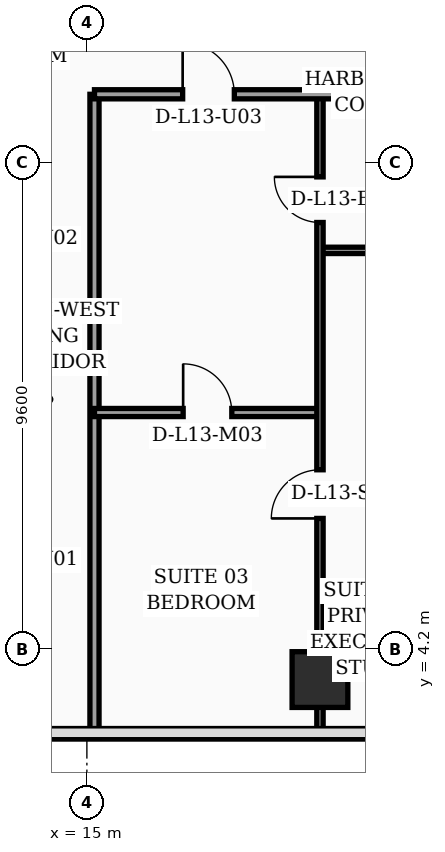
"""IFC4 building model, lengths in metres.
Left out: names, types, materials, properties, quantities, classifications, styles, units other than length and angle.
Written with IfcOpenShell. Run it as: python <this file> out.ifc"""

import sys

from ifc_helpers import new_model, si_unit, direction, frame, frame_2d, origin, origin_2d, place, context, subcontext, project, spatial, rectangle, hollow_rectangle, extrude, element, fill, save


model = new_model("IFC4")
c1 = context("Model", 3, precision=1e-05, world=origin(), true_north=direction((0.0, 1.0)))
c2 = subcontext(c1, "Body", "Model", "MODEL_VIEW")
j1 = project(units=[si_unit("LENGTHUNIT", "METRE"), si_unit("PLANEANGLEUNIT", "RADIAN")], contexts=[c1])
p1 = place(None, origin())
s1 = spatial("IfcSite", under=j1, at=p1, CompositionType="ELEMENT")
p2 = place(p1, origin())
s2 = spatial("IfcBuilding", under=s1, at=p2, CompositionType="ELEMENT")
p3 = place(p2, frame((0.0, 0.0, 58.4)))
s3 = spatial("IfcBuildingStorey", under=s2, at=p3, CompositionType="ELEMENT", Elevation=58.4)
p4 = place(p3, frame((19.6, 3.6, 0.0), z_axis=(0.0, 0.0, 1.0), x_axis=(1.0, 0.0, 0.0)))
e1 = element("IfcColumn", 1, at=p4, inside=s3, PredefinedType="COLUMN", context=c2, shape_type="SweptSolid", body=[
    extrude(hollow_rectangle(XDim=1.1, YDim=1.1, WallThickness=0.045, at=origin_2d()), origin(), (0.0, 0.0, 1.0), 3.56),
])
p5 = place(p3, frame((15.15, 2.44, 0.0), z_axis=(0.0, 0.0, 1.0), x_axis=(0.0, 1.0, 0.0)))
e2 = element("IfcWall", 2, at=p5, inside=s3, PredefinedType="PARTITIONING", context=c2, shape_type="SweptSolid", body=[
    extrude(rectangle(XDim=12.71, YDim=0.18, at=frame_2d((6.355, 0.0))), origin(), (0.0, 0.0, 1.0), 3.04),
])
p6 = place(p3, frame((19.6, 12.07, 0.0), z_axis=(0.0, 0.0, 1.0), x_axis=(1.0, 0.0, 0.0)))
e3 = element("IfcWall", 3, at=p6, inside=s3, PredefinedType="PARTITIONING", context=c2, shape_type="SweptSolid", body=[
    extrude(rectangle(XDim=2.0, YDim=0.125, at=frame_2d((1.0, 0.0))), origin(), (0.0, 0.0, 1.0), 3.56),
])
p7 = place(p3, frame((15.15, 8.87, 0.0), z_axis=(0.0, 0.0, 1.0), x_axis=(1.0, 0.0, 0.0)))
e4 = element("IfcWall", 4, at=p7, inside=s3, PredefinedType="PARTITIONING", context=c2, shape_type="SweptSolid", body=[
    extrude(rectangle(XDim=4.45, YDim=0.16, at=frame_2d((2.225, 0.0))), origin(), (0.0, 0.0, 1.0), 3.56),
])
p8 = place(p7, frame((1.75, 0.0, 0.0)))
e5 = element("IfcOpeningElement", 5, at=p8, cuts=e4, PredefinedType="OPENING", context=c2, shape_type="SweptSolid", body=[
    extrude(rectangle(XDim=0.96, YDim=2.2, at=frame_2d((0.48, 1.1))), frame((0.0, 0.09, 0.0), z_axis=(0.0, -1.0, 0.0), x_axis=(1.0, 0.0, 0.0)), (0.0, 0.0, 1.0), 0.18),
])
p9 = place(p3, frame((19.6, 2.44, 0.0), z_axis=(0.0, 0.0, 1.0), x_axis=(0.0, 1.0, 0.0)))
e6 = element("IfcWall", 6, at=p9, inside=s3, PredefinedType="PARTITIONING", context=c2, shape_type="SweptSolid", body=[
    extrude(rectangle(XDim=12.71, YDim=0.125, at=frame_2d((6.355, 0.0))), origin(), (0.0, 0.0, 1.0), 2.34),
])
p10 = place(p9, frame((4.34, 0.0, 0.0)))
e7 = element("IfcOpeningElement", 7, at=p10, cuts=e6, PredefinedType="OPENING", context=c2, shape_type="SweptSolid", body=[
    extrude(rectangle(XDim=0.96, YDim=2.2, at=frame_2d((0.48, 1.1))), frame((0.0, 0.073, 0.0), z_axis=(0.0, -1.0, 0.0), x_axis=(1.0, 0.0, 0.0)), (0.0, 0.0, 1.0), 0.145),
])
p11 = place(p9, frame((10.18, 0.0, 0.0)))
e8 = element("IfcOpeningElement", 8, at=p11, cuts=e6, PredefinedType="OPENING", context=c2, shape_type="SweptSolid", body=[
    extrude(rectangle(XDim=0.9, YDim=2.15, at=frame_2d((0.45, 1.075))), frame((0.0, 0.073, 0.0), z_axis=(0.0, -1.0, 0.0), x_axis=(1.0, 0.0, 0.0)), (0.0, 0.0, 1.0), 0.145),
])
p12 = place(p3, frame((15.15, 15.15, 0.0), z_axis=(0.0, 0.0, 1.0), x_axis=(1.0, 0.0, 0.0)))
e9 = element("IfcWall", 9, at=p12, inside=s3, PredefinedType="PARTITIONING", context=c2, shape_type="SweptSolid", body=[
    extrude(rectangle(XDim=6.45, YDim=0.18, at=frame_2d((3.225, 0.0))), origin(), (0.0, 0.0, 1.0), 2.34),
])
p13 = place(p12, frame((1.74, 0.0, 0.0)))
e10 = element("IfcOpeningElement", 10, at=p13, cuts=e9, PredefinedType="OPENING", context=c2, shape_type="SweptSolid", body=[
    extrude(rectangle(XDim=1.02, YDim=2.2, at=frame_2d((0.51, 1.1))), frame((0.0, 0.1, 0.0), z_axis=(0.0, -1.0, 0.0), x_axis=(1.0, 0.0, 0.0)), (0.0, 0.0, 1.0), 0.2),
])
p14 = place(p8, origin())
e11 = element("IfcDoor", 11, at=p14, inside=s3, OperationType="SINGLE_SWING_LEFT", PredefinedType="DOOR", context=c2, shape_type="SweptSolid", body=[
    extrude(rectangle(XDim=0.96, YDim=2.2, at=frame_2d((0.48, 1.1))), frame((0.0, 0.025, 0.0), z_axis=(0.0, -1.0, 0.0), x_axis=(1.0, 0.0, 0.0)), (0.0, 0.0, 1.0), 0.05),
])
fill(e5, e11)
p15 = place(p10, origin())
e12 = element("IfcDoor", 12, at=p15, inside=s3, OperationType="SINGLE_SWING_LEFT", PredefinedType="DOOR", context=c2, shape_type="SweptSolid", body=[
    extrude(rectangle(XDim=0.96, YDim=2.2, at=frame_2d((0.48, 1.1))), frame((0.0, 0.025, 0.0), z_axis=(0.0, -1.0, 0.0), x_axis=(1.0, 0.0, 0.0)), (0.0, 0.0, 1.0), 0.05),
])
fill(e7, e12)
p16 = place(p11, origin())
e13 = element("IfcDoor", 13, at=p16, inside=s3, OperationType="SINGLE_SWING_RIGHT", PredefinedType="DOOR", context=c2, shape_type="SweptSolid", body=[
    extrude(rectangle(XDim=0.9, YDim=2.15, at=frame_2d((0.45, 1.075))), frame((0.0, 0.025, 0.0), z_axis=(0.0, -1.0, 0.0), x_axis=(1.0, 0.0, 0.0)), (0.0, 0.0, 1.0), 0.05),
])
fill(e8, e13)
p17 = place(p13, origin())
e14 = element("IfcDoor", 14, at=p17, inside=s3, OperationType="SINGLE_SWING_LEFT", PredefinedType="DOOR", context=c2, shape_type="SweptSolid", body=[
    extrude(rectangle(XDim=1.02, YDim=2.2, at=frame_2d((0.51, 1.1))), frame((0.0, 0.025, 0.0), z_axis=(0.0, -1.0, 0.0), x_axis=(1.0, 0.0, 0.0)), (0.0, 0.0, 1.0), 0.05),
])
fill(e10, e14)
save(model, sys.argv[1])
